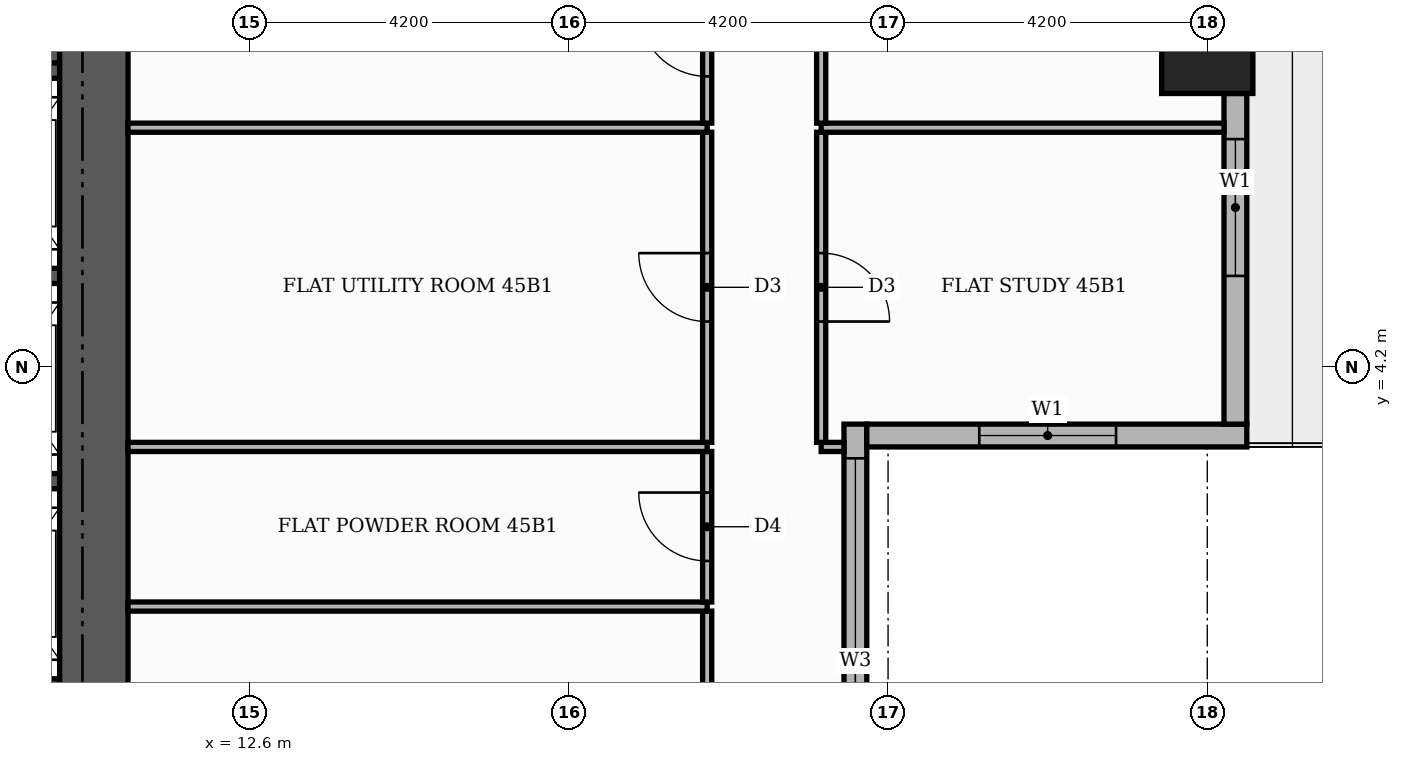
"""IFC4 building model, lengths in metres.
Left out: names, types, materials, properties, quantities, classifications, styles, units other than length and angle.
Written with IfcOpenShell. Run it as: python <this file> out.ifc"""

import sys

from ifc_helpers import new_model, si_unit, direction, frame, frame_2d, origin, origin_2d, place, context, subcontext, project, spatial, rectangle, extrude, element, fill, save


model = new_model("IFC4")
c1 = context("Model", 3, precision=1e-05, world=origin(), true_north=direction((0.0, 1.0)))
c2 = subcontext(c1, "Body", "Model", "MODEL_VIEW")
j1 = project(units=[si_unit("LENGTHUNIT", "METRE"), si_unit("PLANEANGLEUNIT", "RADIAN")], contexts=[c1])
p1 = place(None, origin())
s1 = spatial("IfcSite", under=j1, at=p1, CompositionType="ELEMENT")
p2 = place(p1, origin())
s2 = spatial("IfcBuilding", under=s1, at=p2, CompositionType="ELEMENT")
p3 = place(p2, frame((0.0, 0.0, 192.3)))
s3 = spatial("IfcBuildingStorey", under=s2, at=p3, CompositionType="ELEMENT", Elevation=192.3)
p4 = place(p3, frame((5.5, 9.15, 0.0), z_axis=(0.0, 0.0, 1.0), x_axis=(1.0, 0.0, 0.0)))
e1 = element("IfcWall", 1, at=p4, inside=s3, PredefinedType="SHEAR", context=c2, shape_type="SweptSolid", body=[
    extrude(rectangle(XDim=4.6, YDim=1.9, at=frame_2d((2.3, 0.0))), origin(), (0.0, 0.0, 1.0), 3.48),
])
for number, where, z_axis, x_axis in (
    (2, (8.1, 0.0, 0.0), (0.0, 0.0, 1.0), (1.0, 0.0, 0.0)),
    (3, (8.1, 2.7, 0.0), (0.0, 0.0, 1.0), (1.0, 0.0, 0.0)),
    (4, (8.1, 5.4, 0.0), (0.0, 0.0, 1.0), (1.0, 0.0, 0.0)),
    (5, (8.1, 8.1, 0.0), (0.0, 0.0, 1.0), (1.0, 0.0, 0.0)),
):
    element("IfcWall", number, at=place(p3, frame(where, z_axis=z_axis, x_axis=x_axis)), inside=s3, PredefinedType="SHEAR", context=c2, shape_type="SweptSolid", body=[
        extrude(rectangle(XDim=2.0, YDim=0.2, at=frame_2d((1.0, 0.0))), origin(), (0.0, 0.0, 1.0), 3.48),
    ])
p5 = place(p3, frame((10.55, -10.1, 0.0), z_axis=(0.0, 0.0, 1.0), x_axis=(0.0, 1.0, 0.0)))
e6 = element("IfcWall", 6, at=p5, inside=s3, PredefinedType="SHEAR", context=c2, shape_type="SweptSolid", body=[
    extrude(rectangle(XDim=20.2, YDim=0.9, at=frame_2d((10.1, 0.0))), origin(), (0.0, 0.0, 1.0), 3.48),
])
p6 = place(p3, frame((25.2, 8.4, 0.0), z_axis=(0.0, 0.0, 1.0), x_axis=(1.0, 0.0, 0.0)))
e7 = element("IfcColumn", 7, at=p6, inside=s3, PredefinedType="COLUMN", context=c2, shape_type="SweptSolid", body=[
    extrude(rectangle(XDim=1.2, YDim=1.2, at=origin_2d()), origin(), (0.0, 0.0, 1.0), 3.9),
])
p7 = place(p3, frame((20.57, -3.15, 0.0), z_axis=(0.0, 0.0, 1.0), x_axis=(0.0, 1.0, 0.0)))
e8 = element("IfcWall", 8, at=p7, inside=s3, PredefinedType="STANDARD", context=c2, shape_type="SweptSolid", body=[
    extrude(rectangle(XDim=6.6, YDim=0.3, at=frame_2d((3.3, 0.0))), origin(), (0.0, 0.0, 1.0), 3.48),
])
p8 = place(p7, frame((0.15, 0.0, 0.9)))
e9 = element("IfcOpeningElement", 9, at=p8, cuts=e8, PredefinedType="OPENING", context=c2, shape_type="SweptSolid", body=[
    extrude(rectangle(XDim=6.0, YDim=2.1, at=frame_2d((3.0, 1.05))), frame((0.0, 0.16, 0.0), z_axis=(0.0, -1.0, 0.0), x_axis=(1.0, 0.0, 0.0)), (0.0, 0.0, 1.0), 0.32),
])
p9 = place(p3, frame((20.72, 3.3, 0.0), z_axis=(0.0, 0.0, 1.0), x_axis=(1.0, 0.0, 0.0)))
e10 = element("IfcWall", 10, at=p9, inside=s3, PredefinedType="STANDARD", context=c2, shape_type="SweptSolid", body=[
    extrude(rectangle(XDim=5.0, YDim=0.3, at=frame_2d((2.5, 0.0))), origin(), (0.0, 0.0, 1.0), 3.48),
])
p10 = place(p9, frame((1.48, 0.0, 0.9)))
e11 = element("IfcOpeningElement", 11, at=p10, cuts=e10, PredefinedType="OPENING", context=c2, shape_type="SweptSolid", body=[
    extrude(rectangle(XDim=1.8, YDim=2.1, at=frame_2d((0.9, 1.05))), frame((0.0, 0.16, 0.0), z_axis=(0.0, -1.0, 0.0), x_axis=(1.0, 0.0, 0.0)), (0.0, 0.0, 1.0), 0.32),
])
p11 = place(p3, frame((25.57, 3.45, 0.0), z_axis=(0.0, 0.0, 1.0), x_axis=(0.0, 1.0, 0.0)))
e12 = element("IfcWall", 12, at=p11, inside=s3, PredefinedType="STANDARD", context=c2, shape_type="SweptSolid", body=[
    extrude(rectangle(XDim=4.35, YDim=0.3, at=frame_2d((2.175, 0.0))), origin(), (0.0, 0.0, 1.0), 3.48),
])
p12 = place(p11, frame((1.95, 0.0, 0.9)))
e13 = element("IfcOpeningElement", 13, at=p12, cuts=e12, PredefinedType="OPENING", context=c2, shape_type="SweptSolid", body=[
    extrude(rectangle(XDim=1.8, YDim=2.1, at=frame_2d((0.9, 1.05))), frame((0.0, 0.16, 0.0), z_axis=(0.0, -1.0, 0.0), x_axis=(1.0, 0.0, 0.0)), (0.0, 0.0, 1.0), 0.32),
])
p13 = place(p3, frame((18.62, -3.09, 0.0), z_axis=(0.0, 0.0, 1.0), x_axis=(0.0, 1.0, 0.0)))
e14 = element("IfcWall", 14, at=p13, inside=s3, PredefinedType="PARTITIONING", context=c2, shape_type="SweptSolid", body=[
    extrude(rectangle(XDim=4.08, YDim=0.12, at=frame_2d((2.04, 0.0))), origin(), (0.0, 0.0, 1.0), 3.48),
])
p14 = place(p13, frame((1.59, 0.0, 0.0)))
e15 = element("IfcOpeningElement", 15, at=p14, cuts=e14, PredefinedType="OPENING", context=c2, shape_type="SweptSolid", body=[
    extrude(rectangle(XDim=0.9, YDim=2.1, at=frame_2d((0.45, 1.05))), frame((0.0, 0.07, 0.0), z_axis=(0.0, -1.0, 0.0), x_axis=(1.0, 0.0, 0.0)), (0.0, 0.0, 1.0), 0.14),
])
p15 = place(p3, frame((11.0, 1.05, 0.0), z_axis=(0.0, 0.0, 1.0), x_axis=(1.0, 0.0, 0.0)))
e16 = element("IfcWall", 16, at=p15, inside=s3, PredefinedType="PARTITIONING", context=c2, shape_type="SweptSolid", body=[
    extrude(rectangle(XDim=7.62, YDim=0.12, at=frame_2d((3.81, 0.0))), origin(), (0.0, 0.0, 1.0), 3.48),
])
p16 = place(p3, frame((18.62, 1.11, 0.0), z_axis=(0.0, 0.0, 1.0), x_axis=(0.0, 1.0, 0.0)))
e17 = element("IfcWall", 17, at=p16, inside=s3, PredefinedType="PARTITIONING", context=c2, shape_type="SweptSolid", body=[
    extrude(rectangle(XDim=1.98, YDim=0.12, at=frame_2d((0.99, 0.0))), origin(), (0.0, 0.0, 1.0), 3.48),
])
p17 = place(p16, frame((0.54, 0.0, 0.0)))
e18 = element("IfcOpeningElement", 18, at=p17, cuts=e17, PredefinedType="OPENING", context=c2, shape_type="SweptSolid", body=[
    extrude(rectangle(XDim=0.9, YDim=2.1, at=frame_2d((0.45, 1.05))), frame((0.0, 0.07, 0.0), z_axis=(0.0, -1.0, 0.0), x_axis=(1.0, 0.0, 0.0)), (0.0, 0.0, 1.0), 0.14),
])
p18 = place(p3, frame((11.0, 3.15, 0.0), z_axis=(0.0, 0.0, 1.0), x_axis=(1.0, 0.0, 0.0)))
e19 = element("IfcWall", 19, at=p18, inside=s3, PredefinedType="PARTITIONING", context=c2, shape_type="SweptSolid", body=[
    extrude(rectangle(XDim=7.62, YDim=0.12, at=frame_2d((3.81, 0.0))), origin(), (0.0, 0.0, 1.0), 3.48),
])
p19 = place(p3, frame((20.12, 3.15, 0.0), z_axis=(0.0, 0.0, 1.0), x_axis=(1.0, 0.0, 0.0)))
e20 = element("IfcWall", 20, at=p19, inside=s3, PredefinedType="PARTITIONING", context=c2, shape_type="SweptSolid", body=[
    extrude(rectangle(XDim=0.3, YDim=0.12, at=frame_2d((0.15, 0.0))), origin(), (0.0, 0.0, 1.0), 3.48),
])
p20 = place(p3, frame((18.62, 3.21, 0.0), z_axis=(0.0, 0.0, 1.0), x_axis=(0.0, 1.0, 0.0)))
e21 = element("IfcWall", 21, at=p20, inside=s3, PredefinedType="PARTITIONING", context=c2, shape_type="SweptSolid", body=[
    extrude(rectangle(XDim=4.08, YDim=0.12, at=frame_2d((2.04, 0.0))), origin(), (0.0, 0.0, 1.0), 3.48),
])
p21 = place(p20, frame((1.59, 0.0, 0.0)))
e22 = element("IfcOpeningElement", 22, at=p21, cuts=e21, PredefinedType="OPENING", context=c2, shape_type="SweptSolid", body=[
    extrude(rectangle(XDim=0.9, YDim=2.1, at=frame_2d((0.45, 1.05))), frame((0.0, 0.07, 0.0), z_axis=(0.0, -1.0, 0.0), x_axis=(1.0, 0.0, 0.0)), (0.0, 0.0, 1.0), 0.14),
])
p22 = place(p3, frame((20.12, 3.21, 0.0), z_axis=(0.0, 0.0, 1.0), x_axis=(0.0, 1.0, 0.0)))
e23 = element("IfcWall", 23, at=p22, inside=s3, PredefinedType="PARTITIONING", context=c2, shape_type="SweptSolid", body=[
    extrude(rectangle(XDim=4.08, YDim=0.12, at=frame_2d((2.04, 0.0))), origin(), (0.0, 0.0, 1.0), 3.48),
])
p23 = place(p22, frame((1.59, 0.0, 0.0)))
e24 = element("IfcOpeningElement", 24, at=p23, cuts=e23, PredefinedType="OPENING", context=c2, shape_type="SweptSolid", body=[
    extrude(rectangle(XDim=0.9, YDim=2.1, at=frame_2d((0.45, 1.05))), frame((0.0, 0.07, 0.0), z_axis=(0.0, -1.0, 0.0), x_axis=(1.0, 0.0, 0.0)), (0.0, 0.0, 1.0), 0.14),
])
p24 = place(p3, frame((11.0, 7.35, 0.0), z_axis=(0.0, 0.0, 1.0), x_axis=(1.0, 0.0, 0.0)))
e25 = element("IfcWall", 25, at=p24, inside=s3, PredefinedType="PARTITIONING", context=c2, shape_type="SweptSolid", body=[
    extrude(rectangle(XDim=7.62, YDim=0.12, at=frame_2d((3.81, 0.0))), origin(), (0.0, 0.0, 1.0), 3.48),
])
p25 = place(p3, frame((20.12, 7.35, 0.0), z_axis=(0.0, 0.0, 1.0), x_axis=(1.0, 0.0, 0.0)))
e26 = element("IfcWall", 26, at=p25, inside=s3, PredefinedType="PARTITIONING", context=c2, shape_type="SweptSolid", body=[
    extrude(rectangle(XDim=5.3, YDim=0.12, at=frame_2d((2.65, 0.0))), origin(), (0.0, 0.0, 1.0), 3.48),
])
p26 = place(p3, frame((18.62, 7.41, 0.0), z_axis=(0.0, 0.0, 1.0), x_axis=(0.0, 1.0, 0.0)))
e27 = element("IfcWall", 27, at=p26, inside=s3, PredefinedType="PARTITIONING", context=c2, shape_type="SweptSolid", body=[
    extrude(rectangle(XDim=2.13, YDim=0.12, at=frame_2d((1.065, 0.0))), origin(), (0.0, 0.0, 1.0), 3.48),
])
p27 = place(p26, frame((0.615, 0.0, 0.0)))
e28 = element("IfcOpeningElement", 28, at=p27, cuts=e27, PredefinedType="OPENING", context=c2, shape_type="SweptSolid", body=[
    extrude(rectangle(XDim=0.9, YDim=2.1, at=frame_2d((0.45, 1.05))), frame((0.0, 0.07, 0.0), z_axis=(0.0, -1.0, 0.0), x_axis=(1.0, 0.0, 0.0)), (0.0, 0.0, 1.0), 0.14),
])
p28 = place(p3, frame((20.12, 7.41, 0.0), z_axis=(0.0, 0.0, 1.0), x_axis=(0.0, 1.0, 0.0)))
e29 = element("IfcWall", 29, at=p28, inside=s3, PredefinedType="PARTITIONING", context=c2, shape_type="SweptSolid", body=[
    extrude(rectangle(XDim=4.08, YDim=0.12, at=frame_2d((2.04, 0.0))), origin(), (0.0, 0.0, 1.0), 3.48),
])
p29 = place(p28, frame((1.59, 0.0, 0.0)))
e30 = element("IfcOpeningElement", 30, at=p29, cuts=e29, PredefinedType="OPENING", context=c2, shape_type="SweptSolid", body=[
    extrude(rectangle(XDim=0.9, YDim=2.1, at=frame_2d((0.45, 1.05))), frame((0.0, 0.07, 0.0), z_axis=(0.0, -1.0, 0.0), x_axis=(1.0, 0.0, 0.0)), (0.0, 0.0, 1.0), 0.14),
])
p30 = place(p8, origin())
e31 = element("IfcWindow", 31, at=p30, inside=s3, PartitioningType="SINGLE_PANEL", PredefinedType="WINDOW", context=c2, shape_type="SweptSolid", body=[
    extrude(rectangle(XDim=6.0, YDim=2.1, at=frame_2d((3.0, 1.05))), frame((0.0, 0.03, 0.0), z_axis=(0.0, -1.0, 0.0), x_axis=(1.0, 0.0, 0.0)), (0.0, 0.0, 1.0), 0.06),
])
fill(e9, e31)
p31 = place(p10, origin())
e32 = element("IfcWindow", 32, at=p31, inside=s3, PartitioningType="SINGLE_PANEL", PredefinedType="WINDOW", context=c2, shape_type="SweptSolid", body=[
    extrude(rectangle(XDim=1.8, YDim=2.1, at=frame_2d((0.9, 1.05))), frame((0.0, 0.03, 0.0), z_axis=(0.0, -1.0, 0.0), x_axis=(1.0, 0.0, 0.0)), (0.0, 0.0, 1.0), 0.06),
])
fill(e11, e32)
p32 = place(p12, origin())
e33 = element("IfcWindow", 33, at=p32, inside=s3, PartitioningType="SINGLE_PANEL", PredefinedType="WINDOW", context=c2, shape_type="SweptSolid", body=[
    extrude(rectangle(XDim=1.8, YDim=2.1, at=frame_2d((0.9, 1.05))), frame((0.0, 0.03, 0.0), z_axis=(0.0, -1.0, 0.0), x_axis=(1.0, 0.0, 0.0)), (0.0, 0.0, 1.0), 0.06),
])
fill(e13, e33)
p33 = place(p17, origin())
e34 = element("IfcDoor", 34, at=p33, inside=s3, OperationType="SINGLE_SWING_RIGHT", PredefinedType="DOOR", context=c2, shape_type="SweptSolid", body=[
    extrude(rectangle(XDim=0.9, YDim=2.1, at=frame_2d((0.45, 1.05))), frame((0.0, 0.025, 0.0), z_axis=(0.0, -1.0, 0.0), x_axis=(1.0, 0.0, 0.0)), (0.0, 0.0, 1.0), 0.05),
])
fill(e18, e34)
p34 = place(p21, origin())
e35 = element("IfcDoor", 35, at=p34, inside=s3, OperationType="SINGLE_SWING_RIGHT", PredefinedType="DOOR", context=c2, shape_type="SweptSolid", body=[
    extrude(rectangle(XDim=0.9, YDim=2.1, at=frame_2d((0.45, 1.05))), frame((0.0, 0.025, 0.0), z_axis=(0.0, -1.0, 0.0), x_axis=(1.0, 0.0, 0.0)), (0.0, 0.0, 1.0), 0.05),
])
fill(e22, e35)
p35 = place(p27, origin())
e36 = element("IfcDoor", 36, at=p35, inside=s3, OperationType="SINGLE_SWING_RIGHT", PredefinedType="DOOR", context=c2, shape_type="SweptSolid", body=[
    extrude(rectangle(XDim=0.9, YDim=2.1, at=frame_2d((0.45, 1.05))), frame((0.0, 0.025, 0.0), z_axis=(0.0, -1.0, 0.0), x_axis=(1.0, 0.0, 0.0)), (0.0, 0.0, 1.0), 0.05),
])
fill(e28, e36)
p36 = place(p23, frame((0.9, 0.0, 0.0), z_axis=(0.0, 0.0, 1.0), x_axis=(-1.0, 0.0, 0.0)))
e37 = element("IfcDoor", 37, at=p36, inside=s3, OperationType="SINGLE_SWING_LEFT", PredefinedType="DOOR", context=c2, shape_type="SweptSolid", body=[
    extrude(rectangle(XDim=0.9, YDim=2.1, at=frame_2d((0.45, 1.05))), frame((0.0, 0.025, 0.0), z_axis=(0.0, -1.0, 0.0), x_axis=(1.0, 0.0, 0.0)), (0.0, 0.0, 1.0), 0.05),
])
fill(e24, e37)
save(model, sys.argv[1])
